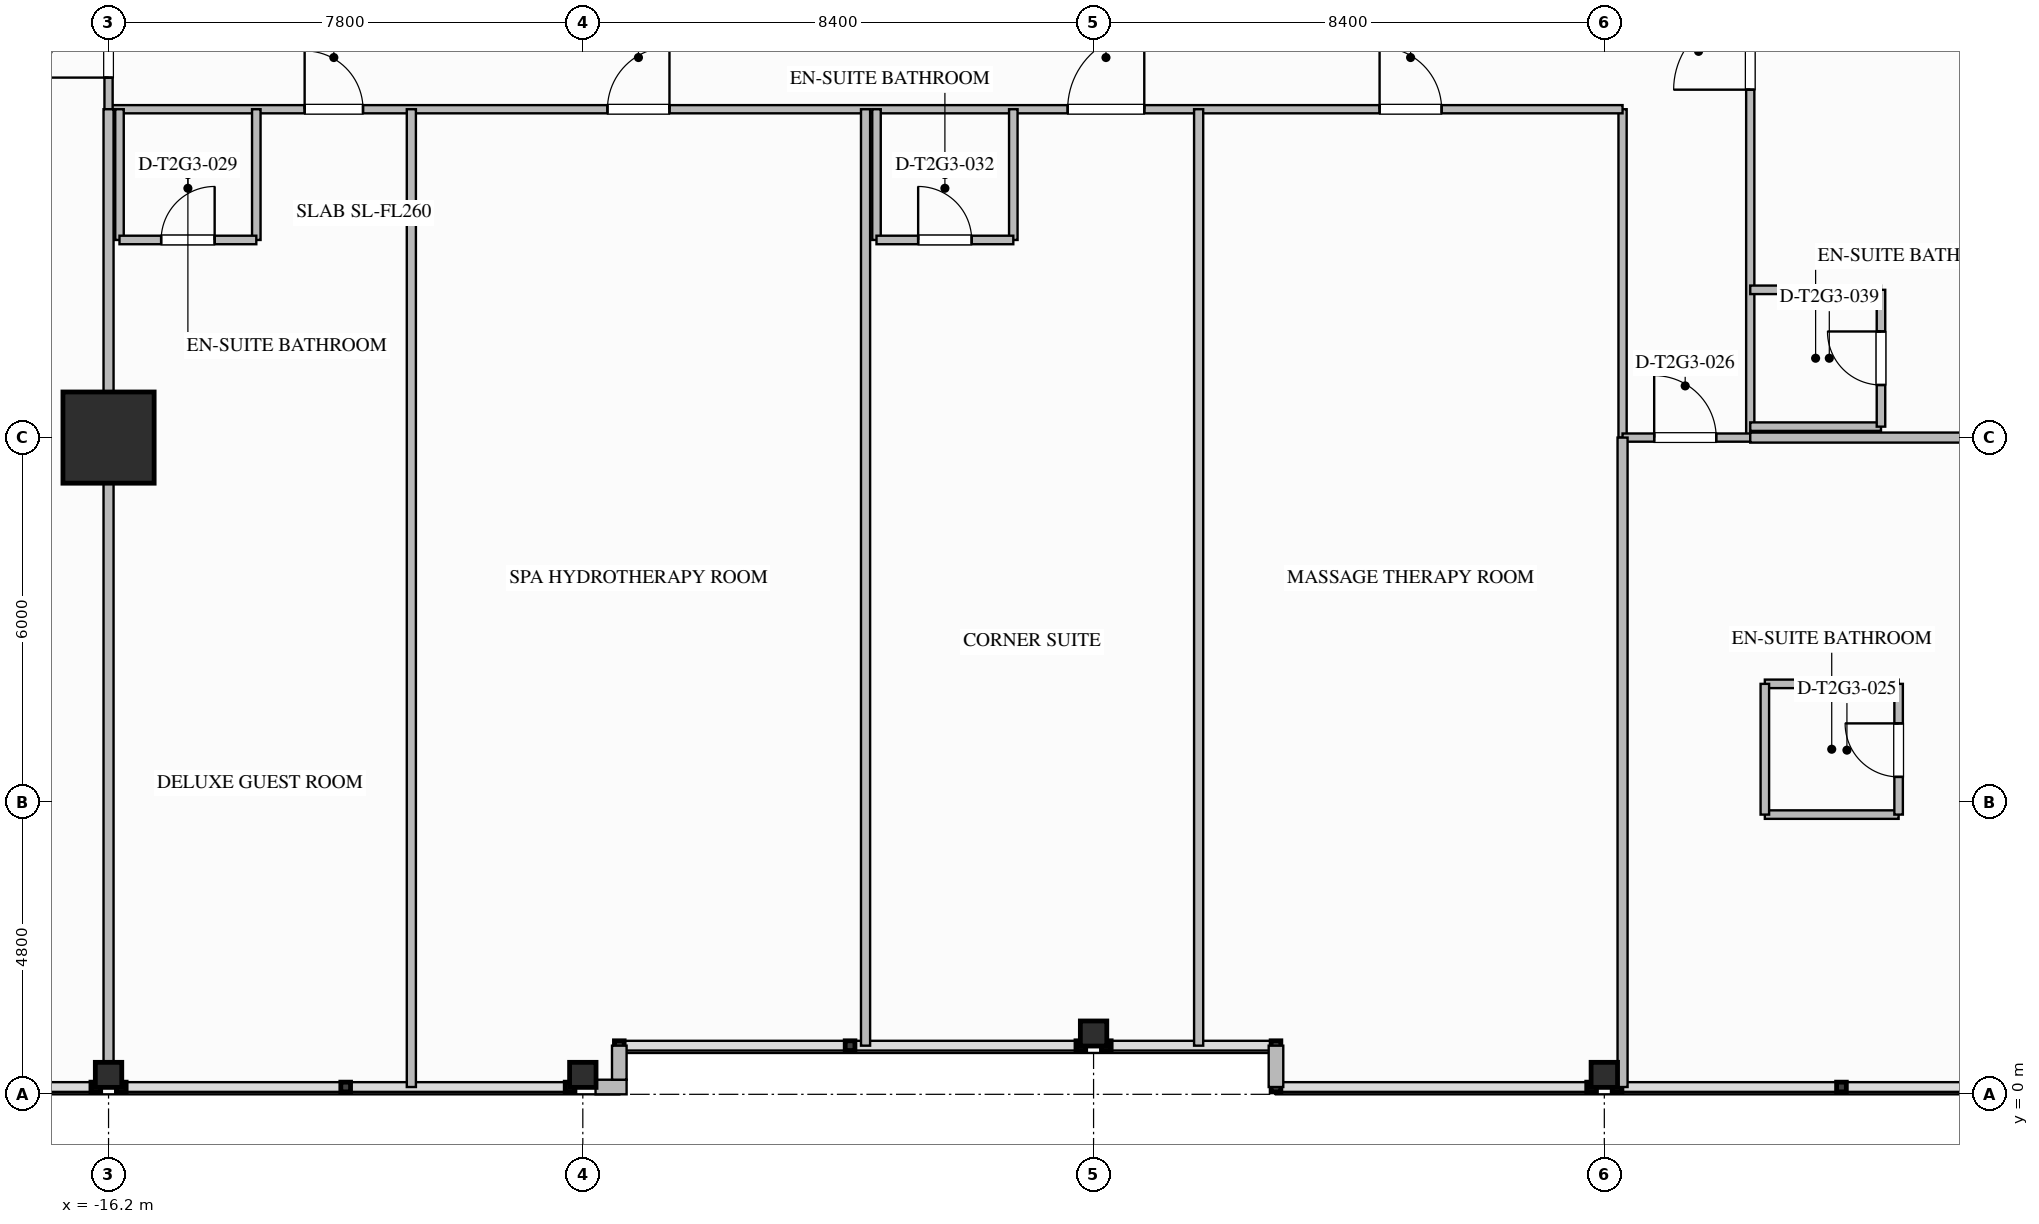
"""IFC4 building model, lengths in metres.
Left out: names, types, materials, properties, quantities, classifications, styles, units other than length and angle.
Written with IfcOpenShell. Run it as: python <this file> out.ifc"""

import sys

from ifc_helpers import new_model, si_unit, direction, frame, frame_2d, origin, origin_2d, place, context, subcontext, project, spatial, rectangle, i_section, extrude, element, fill, save


model = new_model("IFC4")
c1 = context("Model", 3, precision=1e-05, world=origin(), true_north=direction((0.0, 1.0)))
c2 = subcontext(c1, "Body", "Model", "MODEL_VIEW")
j1 = project(units=[si_unit("LENGTHUNIT", "METRE"), si_unit("PLANEANGLEUNIT", "RADIAN")], contexts=[c1])
p1 = place(None, origin())
s1 = spatial("IfcSite", under=j1, at=p1, CompositionType="ELEMENT")
p2 = place(p1, origin())
s2 = spatial("IfcBuilding", under=s1, at=p2, CompositionType="ELEMENT")
p3 = place(p2, frame((0.0, 0.0, 119.8)))
s3 = spatial("IfcBuildingStorey", under=s2, at=p3, CompositionType="ELEMENT", Elevation=119.8)
p4 = place(p3, frame((-16.2, 10.8, 0.0), z_axis=(0.0, 0.0, 1.0), x_axis=(1.0, 0.0, 0.0)))
e1 = element("IfcColumn", 1, at=p4, inside=s3, PredefinedType="COLUMN", context=c2, shape_type="SweptSolid", body=[
    extrude(rectangle(XDim=1.5, YDim=1.5, at=origin_2d()), origin(), (0.0, 0.0, 1.0), 3.5),
])
for number, where, z_axis, x_axis in (
    (2, (-16.2, 0.32, 0.0), (0.0, 0.0, 1.0), (0.0, 1.0, 0.0)),
    (3, (-8.4, 0.32, 0.0), (0.0, 0.0, 1.0), (0.0, 1.0, 0.0)),
    (4, (0.0, 1.0, 0.0), (0.0, 0.0, 1.0), (0.0, 1.0, 0.0)),
    (5, (8.4, 0.32, 0.0), (0.0, 0.0, 1.0), (0.0, 1.0, 0.0)),
):
    element("IfcColumn", number, at=place(p3, frame(where, z_axis=z_axis, x_axis=x_axis)), inside=s3, PredefinedType="COLUMN", context=c2, shape_type="SweptSolid", body=[
        extrude(i_section(OverallWidth=0.412, OverallDepth=0.435, WebThickness=0.036, FlangeThickness=0.057, FilletRadius=0.028, at=origin_2d()), origin(), (0.0, 0.0, 1.0), 3.497),
    ])
p5 = place(p3, frame((-7.68, 0.12, 0.0), z_axis=(0.0, 0.0, 1.0), x_axis=(-1.0, 0.0, 0.0)))
e6 = element("IfcWall", 6, at=p5, inside=s3, PredefinedType="STANDARD", context=c2, shape_type="SweptSolid", body=[
    extrude(rectangle(XDim=0.511, YDim=0.24, at=frame_2d((0.255, 0.0))), origin(), (0.0, 0.0, 1.0), 3.24),
])
p6 = place(p3, frame((3.0, 0.12, 0.0), z_axis=(0.0, 0.0, 1.0), x_axis=(0.0, 1.0, 0.0)))
e7 = element("IfcWall", 7, at=p6, inside=s3, PredefinedType="STANDARD", context=c2, shape_type="SweptSolid", body=[
    extrude(rectangle(XDim=0.68, YDim=0.24, at=frame_2d((0.34, 0.0))), origin(), (0.0, 0.0, 1.0), 3.24),
])
p7 = place(p3, frame((-7.8, 0.8, 0.0), z_axis=(0.0, 0.0, 1.0), x_axis=(0.0, -1.0, 0.0)))
e8 = element("IfcWall", 8, at=p7, inside=s3, PredefinedType="STANDARD", context=c2, shape_type="SweptSolid", body=[
    extrude(rectangle(XDim=0.56, YDim=0.24, at=frame_2d((0.28, 0.0))), origin(), (0.0, 0.0, 1.0), 3.24),
])
p8 = place(p3, frame((8.7, 10.8, 0.0), z_axis=(0.0, 0.0, 1.0), x_axis=(0.0, 1.0, 0.0)))
e9 = element("IfcWall", 9, at=p8, inside=s3, PredefinedType="PARTITIONING", context=c2, shape_type="SweptSolid", body=[
    extrude(rectangle(XDim=5.4, YDim=0.135, at=frame_2d((2.7, 0.0))), origin(), (0.0, 0.0, 1.0), 3.24),
])
p9 = place(p3, frame((-16.2, 16.2, 0.0), z_axis=(0.0, 0.0, 1.0), x_axis=(1.0, 0.0, 0.0)))
e10 = element("IfcWall", 10, at=p9, inside=s3, PredefinedType="PARTITIONING", context=c2, shape_type="SweptSolid", body=[
    extrude(rectangle(XDim=24.9, YDim=0.135, at=frame_2d((12.45, 0.0))), origin(), (0.0, 0.0, 1.0), 3.24),
])
p10 = place(p9, frame((3.225, 0.0, 0.0)))
e11 = element("IfcOpeningElement", 11, at=p10, cuts=e10, PredefinedType="OPENING", context=c2, shape_type="SweptSolid", body=[
    extrude(rectangle(XDim=0.96, YDim=2.15, at=frame_2d((0.48, 1.075))), frame((0.0, 0.077, 0.0), z_axis=(0.0, -1.0, 0.0), x_axis=(1.0, 0.0, 0.0)), (0.0, 0.0, 1.0), 0.155),
])
p11 = place(p9, frame((8.205, 0.0, 0.0)))
e12 = element("IfcOpeningElement", 12, at=p11, cuts=e10, PredefinedType="OPENING", context=c2, shape_type="SweptSolid", body=[
    extrude(rectangle(XDim=1.02, YDim=2.15, at=frame_2d((0.51, 1.075))), frame((0.0, 0.077, 0.0), z_axis=(0.0, -1.0, 0.0), x_axis=(1.0, 0.0, 0.0)), (0.0, 0.0, 1.0), 0.155),
])
p12 = place(p9, frame((15.774, 0.0, 0.0)))
e13 = element("IfcOpeningElement", 13, at=p12, cuts=e10, PredefinedType="OPENING", context=c2, shape_type="SweptSolid", body=[
    extrude(rectangle(XDim=1.26, YDim=2.2, at=frame_2d((0.63, 1.1))), frame((0.0, 0.077, 0.0), z_axis=(0.0, -1.0, 0.0), x_axis=(1.0, 0.0, 0.0)), (0.0, 0.0, 1.0), 0.155),
])
p13 = place(p9, frame((20.904, 0.0, 0.0)))
e14 = element("IfcOpeningElement", 14, at=p13, cuts=e10, PredefinedType="OPENING", context=c2, shape_type="SweptSolid", body=[
    extrude(rectangle(XDim=1.02, YDim=2.15, at=frame_2d((0.51, 1.075))), frame((0.0, 0.077, 0.0), z_axis=(0.0, -1.0, 0.0), x_axis=(1.0, 0.0, 0.0)), (0.0, 0.0, 1.0), 0.155),
])
p14 = place(p3, frame((10.8, 10.8, 0.0), z_axis=(0.0, 0.0, 1.0), x_axis=(0.0, 1.0, 0.0)))
e15 = element("IfcWall", 15, at=p14, inside=s3, PredefinedType="PARTITIONING", context=c2, shape_type="SweptSolid", body=[
    extrude(rectangle(XDim=32.4, YDim=0.135, at=frame_2d((16.2, 0.0))), origin(), (0.0, 0.0, 1.0), 3.24),
])
p15 = place(p14, frame((5.722, 0.0, 0.0)))
e16 = element("IfcOpeningElement", 16, at=p15, cuts=e15, PredefinedType="OPENING", context=c2, shape_type="SweptSolid", body=[
    extrude(rectangle(XDim=1.26, YDim=2.2, at=frame_2d((0.63, 1.1))), frame((0.0, 0.077, 0.0), z_axis=(0.0, -1.0, 0.0), x_axis=(1.0, 0.0, 0.0)), (0.0, 0.0, 1.0), 0.155),
])
p16 = place(p14, frame((16.085, 0.0, 0.0)))
e17 = element("IfcOpeningElement", 17, at=p16, cuts=e15, PredefinedType="OPENING", context=c2, shape_type="SweptSolid", body=[
    extrude(rectangle(XDim=1.02, YDim=2.15, at=frame_2d((0.51, 1.075))), frame((0.0, 0.077, 0.0), z_axis=(0.0, -1.0, 0.0), x_axis=(1.0, 0.0, 0.0)), (0.0, 0.0, 1.0), 0.155),
])
p17 = place(p14, frame((28.244, 0.0, 0.0)))
e18 = element("IfcOpeningElement", 18, at=p17, cuts=e15, PredefinedType="OPENING", context=c2, shape_type="SweptSolid", body=[
    extrude(rectangle(XDim=1.26, YDim=2.2, at=frame_2d((0.63, 1.1))), frame((0.0, 0.077, 0.0), z_axis=(0.0, -1.0, 0.0), x_axis=(1.0, 0.0, 0.0)), (0.0, 0.0, 1.0), 0.155),
])
p18 = place(p3, frame((-16.2, 16.2, 0.0), z_axis=(0.0, 0.0, 1.0), x_axis=(0.0, 1.0, 0.0)))
e19 = element("IfcWall", 19, at=p18, inside=s3, PredefinedType="PARTITIONING", context=c2, shape_type="SweptSolid", body=[
    extrude(rectangle(XDim=2.1, YDim=0.135, at=frame_2d((1.05, 0.0))), origin(), (0.0, 0.0, 1.0), 2.53),
])
p19 = place(p18, frame((0.52, 0.0, 0.0)))
e20 = element("IfcOpeningElement", 20, at=p19, cuts=e19, PredefinedType="OPENING", context=c2, shape_type="SweptSolid", body=[
    extrude(rectangle(XDim=1.02, YDim=2.15, at=frame_2d((0.51, 1.075))), frame((0.0, 0.077, 0.0), z_axis=(0.0, -1.0, 0.0), x_axis=(1.0, 0.0, 0.0)), (0.0, 0.0, 1.0), 0.155),
])
p20 = place(p3, frame((8.7, 10.8, 0.0), z_axis=(0.0, 0.0, 1.0), x_axis=(1.0, 0.0, 0.0)))
e21 = element("IfcWall", 21, at=p20, inside=s3, PredefinedType="PARTITIONING", context=c2, shape_type="SweptSolid", body=[
    extrude(rectangle(XDim=2.1, YDim=0.135, at=frame_2d((1.05, 0.0))), origin(), (0.0, 0.0, 1.0), 2.53),
])
p21 = place(p20, frame((0.52, 0.0, 0.0)))
e22 = element("IfcOpeningElement", 22, at=p21, cuts=e21, PredefinedType="OPENING", context=c2, shape_type="SweptSolid", body=[
    extrude(rectangle(XDim=1.02, YDim=2.15, at=frame_2d((0.51, 1.075))), frame((0.0, 0.077, 0.0), z_axis=(0.0, -1.0, 0.0), x_axis=(1.0, 0.0, 0.0)), (0.0, 0.0, 1.0), 0.155),
])
p22 = place(p3, frame((-16.2, 0.12, 0.0), z_axis=(0.0, 0.0, 1.0), x_axis=(0.0, 1.0, 0.0)))
e23 = element("IfcWall", 23, at=p22, inside=s3, PredefinedType="PARTITIONING", context=c2, shape_type="SweptSolid", body=[
    extrude(rectangle(XDim=16.08, YDim=0.165, at=frame_2d((8.04, 0.0))), origin(), (0.0, 0.0, 1.0), 2.53),
])
p23 = place(p3, frame((8.7, 0.12, 0.0), z_axis=(0.0, 0.0, 1.0), x_axis=(0.0, 1.0, 0.0)))
e24 = element("IfcWall", 24, at=p23, inside=s3, PredefinedType="PARTITIONING", context=c2, shape_type="SweptSolid", body=[
    extrude(rectangle(XDim=10.68, YDim=0.165, at=frame_2d((5.34, 0.0))), origin(), (0.0, 0.0, 1.0), 2.53),
])
p24 = place(p3, frame((10.8, 10.8, 0.0), z_axis=(0.0, 0.0, 1.0), x_axis=(1.0, 0.0, 0.0)))
e25 = element("IfcWall", 25, at=p24, inside=s3, PredefinedType="PARTITIONING", context=c2, shape_type="SweptSolid", body=[
    extrude(rectangle(XDim=11.28, YDim=0.165, at=frame_2d((5.64, 0.0))), origin(), (0.0, 0.0, 1.0), 2.53),
])
for number, where, z_axis, x_axis in (
    (26, (11.04, 4.6, 0.0), (0.0, 0.0, 1.0), (1.0, 0.0, 0.0)),
    (27, (11.04, 6.75, 0.0), (0.0, 0.0, 1.0), (1.0, 0.0, 0.0)),
):
    element("IfcWall", number, at=place(p3, frame(where, z_axis=z_axis, x_axis=x_axis)), inside=s3, PredefinedType="PLUMBINGWALL", context=c2, shape_type="SweptSolid", body=[
        extrude(rectangle(XDim=2.2, YDim=0.14, at=frame_2d((1.1, 0.0))), origin(), (0.0, 0.0, 1.0), 3.24),
    ])
p25 = place(p3, frame((11.04, 4.6, 0.0), z_axis=(0.0, 0.0, 1.0), x_axis=(0.0, 1.0, 0.0)))
e28 = element("IfcWall", 28, at=p25, inside=s3, PredefinedType="PLUMBINGWALL", context=c2, shape_type="SweptSolid", body=[
    extrude(rectangle(XDim=2.15, YDim=0.14, at=frame_2d((1.075, 0.0))), origin(), (0.0, 0.0, 1.0), 3.24),
])
p26 = place(p3, frame((13.24, 4.6, 0.0), z_axis=(0.0, 0.0, 1.0), x_axis=(0.0, 1.0, 0.0)))
e29 = element("IfcWall", 29, at=p26, inside=s3, PredefinedType="PLUMBINGWALL", context=c2, shape_type="SweptSolid", body=[
    extrude(rectangle(XDim=2.15, YDim=0.14, at=frame_2d((1.075, 0.0))), origin(), (0.0, 0.0, 1.0), 3.24),
])
p27 = place(p26, frame((0.62, 0.0, 0.0)))
e30 = element("IfcOpeningElement", 30, at=p27, cuts=e29, PredefinedType="OPENING", context=c2, shape_type="SweptSolid", body=[
    extrude(rectangle(XDim=0.88, YDim=2.1, at=frame_2d((0.44, 1.05))), frame((0.0, 0.08, 0.0), z_axis=(0.0, -1.0, 0.0), x_axis=(1.0, 0.0, 0.0)), (0.0, 0.0, 1.0), 0.16),
])
p28 = place(p3, frame((-16.02, 16.2, 0.0), z_axis=(0.0, 0.0, 1.0), x_axis=(0.0, -1.0, 0.0)))
e31 = element("IfcWall", 31, at=p28, inside=s3, PredefinedType="PLUMBINGWALL", context=c2, shape_type="SweptSolid", body=[
    extrude(rectangle(XDim=2.15, YDim=0.14, at=frame_2d((1.075, 0.0))), origin(), (0.0, 0.0, 1.0), 2.53),
])
p29 = place(p3, frame((-13.77, 16.2, 0.0), z_axis=(0.0, 0.0, 1.0), x_axis=(0.0, -1.0, 0.0)))
e32 = element("IfcWall", 32, at=p29, inside=s3, PredefinedType="PLUMBINGWALL", context=c2, shape_type="SweptSolid", body=[
    extrude(rectangle(XDim=2.15, YDim=0.14, at=frame_2d((1.075, 0.0))), origin(), (0.0, 0.0, 1.0), 3.24),
])
p30 = place(p3, frame((-16.02, 14.05, 0.0), z_axis=(0.0, 0.0, 1.0), x_axis=(1.0, 0.0, 0.0)))
e33 = element("IfcWall", 33, at=p30, inside=s3, PredefinedType="PLUMBINGWALL", context=c2, shape_type="SweptSolid", body=[
    extrude(rectangle(XDim=2.25, YDim=0.14, at=frame_2d((1.125, 0.0))), origin(), (0.0, 0.0, 1.0), 3.24),
])
p31 = place(p30, frame((0.685, 0.0, 0.0)))
e34 = element("IfcOpeningElement", 34, at=p31, cuts=e33, PredefinedType="OPENING", context=c2, shape_type="SweptSolid", body=[
    extrude(rectangle(XDim=0.88, YDim=2.1, at=frame_2d((0.44, 1.05))), frame((0.0, 0.08, 0.0), z_axis=(0.0, -1.0, 0.0), x_axis=(1.0, 0.0, 0.0)), (0.0, 0.0, 1.0), 0.16),
])
p32 = place(p3, frame((-11.22, 0.12, 0.0), z_axis=(0.0, 0.0, 1.0), x_axis=(0.0, 1.0, 0.0)))
e35 = element("IfcWall", 35, at=p32, inside=s3, PredefinedType="PARTITIONING", context=c2, shape_type="SweptSolid", body=[
    extrude(rectangle(XDim=16.08, YDim=0.15, at=frame_2d((8.04, 0.0))), origin(), (0.0, 0.0, 1.0), 3.24),
])
p33 = place(p3, frame((-3.75, 0.8, 0.0), z_axis=(0.0, 0.0, 1.0), x_axis=(0.0, 1.0, 0.0)))
e36 = element("IfcWall", 36, at=p33, inside=s3, PredefinedType="PARTITIONING", context=c2, shape_type="SweptSolid", body=[
    extrude(rectangle(XDim=15.4, YDim=0.15, at=frame_2d((7.7, 0.0))), origin(), (0.0, 0.0, 1.0), 3.24),
])
for number, where, z_axis, x_axis in (
    (37, (-3.57, 16.2, 0.0), (0.0, 0.0, 1.0), (0.0, -1.0, 0.0)),
    (38, (-1.32, 16.2, 0.0), (0.0, 0.0, 1.0), (0.0, -1.0, 0.0)),
):
    element("IfcWall", number, at=place(p3, frame(where, z_axis=z_axis, x_axis=x_axis)), inside=s3, PredefinedType="PLUMBINGWALL", context=c2, shape_type="SweptSolid", body=[
        extrude(rectangle(XDim=2.15, YDim=0.14, at=frame_2d((1.075, 0.0))), origin(), (0.0, 0.0, 1.0), 3.24),
    ])
p34 = place(p3, frame((-3.57, 14.05, 0.0), z_axis=(0.0, 0.0, 1.0), x_axis=(1.0, 0.0, 0.0)))
e39 = element("IfcWall", 39, at=p34, inside=s3, PredefinedType="PLUMBINGWALL", context=c2, shape_type="SweptSolid", body=[
    extrude(rectangle(XDim=2.25, YDim=0.14, at=frame_2d((1.125, 0.0))), origin(), (0.0, 0.0, 1.0), 3.24),
])
p35 = place(p34, frame((0.685, 0.0, 0.0)))
e40 = element("IfcOpeningElement", 40, at=p35, cuts=e39, PredefinedType="OPENING", context=c2, shape_type="SweptSolid", body=[
    extrude(rectangle(XDim=0.88, YDim=2.1, at=frame_2d((0.44, 1.05))), frame((0.0, 0.08, 0.0), z_axis=(0.0, -1.0, 0.0), x_axis=(1.0, 0.0, 0.0)), (0.0, 0.0, 1.0), 0.16),
])
p36 = place(p3, frame((1.728, 0.8, 0.0), z_axis=(0.0, 0.0, 1.0), x_axis=(0.0, 1.0, 0.0)))
e41 = element("IfcWall", 41, at=p36, inside=s3, PredefinedType="PARTITIONING", context=c2, shape_type="SweptSolid", body=[
    extrude(rectangle(XDim=15.4, YDim=0.15, at=frame_2d((7.7, 0.0))), origin(), (0.0, 0.0, 1.0), 3.24),
])
p37 = place(p3, frame((10.8, 10.98, 0.0), z_axis=(0.0, 0.0, 1.0), x_axis=(1.0, 0.0, 0.0)))
e42 = element("IfcWall", 42, at=p37, inside=s3, PredefinedType="PLUMBINGWALL", context=c2, shape_type="SweptSolid", body=[
    extrude(rectangle(XDim=2.15, YDim=0.14, at=frame_2d((1.075, 0.0))), origin(), (0.0, 0.0, 1.0), 2.53),
])
p38 = place(p3, frame((10.8, 13.23, 0.0), z_axis=(0.0, 0.0, 1.0), x_axis=(1.0, 0.0, 0.0)))
e43 = element("IfcWall", 43, at=p38, inside=s3, PredefinedType="PLUMBINGWALL", context=c2, shape_type="SweptSolid", body=[
    extrude(rectangle(XDim=2.15, YDim=0.14, at=frame_2d((1.075, 0.0))), origin(), (0.0, 0.0, 1.0), 3.24),
])
p39 = place(p3, frame((12.95, 10.98, 0.0), z_axis=(0.0, 0.0, 1.0), x_axis=(0.0, 1.0, 0.0)))
e44 = element("IfcWall", 44, at=p39, inside=s3, PredefinedType="PLUMBINGWALL", context=c2, shape_type="SweptSolid", body=[
    extrude(rectangle(XDim=2.25, YDim=0.14, at=frame_2d((1.125, 0.0))), origin(), (0.0, 0.0, 1.0), 3.24),
])
p40 = place(p39, frame((0.685, 0.0, 0.0)))
e45 = element("IfcOpeningElement", 45, at=p40, cuts=e44, PredefinedType="OPENING", context=c2, shape_type="SweptSolid", body=[
    extrude(rectangle(XDim=0.88, YDim=2.1, at=frame_2d((0.44, 1.05))), frame((0.0, 0.08, 0.0), z_axis=(0.0, -1.0, 0.0), x_axis=(1.0, 0.0, 0.0)), (0.0, 0.0, 1.0), 0.16),
])
p41 = place(p19, origin())
e46 = element("IfcDoor", 46, at=p41, inside=s3, OperationType="SINGLE_SWING_LEFT", PredefinedType="DOOR", context=c2, shape_type="SweptSolid", body=[
    extrude(rectangle(XDim=1.02, YDim=2.15, at=frame_2d((0.51, 1.075))), frame((0.0, 0.025, 0.0), z_axis=(0.0, -1.0, 0.0), x_axis=(1.0, 0.0, 0.0)), (0.0, 0.0, 1.0), 0.05),
])
fill(e20, e46)
p42 = place(p27, origin())
e47 = element("IfcDoor", 47, at=p42, inside=s3, OperationType="SINGLE_SWING_RIGHT", PredefinedType="DOOR", context=c2, shape_type="SweptSolid", body=[
    extrude(rectangle(XDim=0.88, YDim=2.1, at=frame_2d((0.44, 1.05))), frame((0.0, 0.025, 0.0), z_axis=(0.0, -1.0, 0.0), x_axis=(1.0, 0.0, 0.0)), (0.0, 0.0, 1.0), 0.05),
])
fill(e30, e47)
p43 = place(p21, origin())
e48 = element("IfcDoor", 48, at=p43, inside=s3, OperationType="SINGLE_SWING_LEFT", PredefinedType="DOOR", context=c2, shape_type="SweptSolid", body=[
    extrude(rectangle(XDim=1.02, YDim=2.15, at=frame_2d((0.51, 1.075))), frame((0.0, 0.025, 0.0), z_axis=(0.0, -1.0, 0.0), x_axis=(1.0, 0.0, 0.0)), (0.0, 0.0, 1.0), 0.05),
])
fill(e22, e48)
p44 = place(p31, origin())
e49 = element("IfcDoor", 49, at=p44, inside=s3, OperationType="SINGLE_SWING_RIGHT", PredefinedType="DOOR", context=c2, shape_type="SweptSolid", body=[
    extrude(rectangle(XDim=0.88, YDim=2.1, at=frame_2d((0.44, 1.05))), frame((0.0, 0.025, 0.0), z_axis=(0.0, -1.0, 0.0), x_axis=(1.0, 0.0, 0.0)), (0.0, 0.0, 1.0), 0.05),
])
fill(e34, e49)
p45 = place(p10, origin())
e50 = element("IfcDoor", 50, at=p45, inside=s3, OperationType="SINGLE_SWING_LEFT", PredefinedType="DOOR", context=c2, shape_type="SweptSolid", body=[
    extrude(rectangle(XDim=0.96, YDim=2.15, at=frame_2d((0.48, 1.075))), frame((0.0, 0.025, 0.0), z_axis=(0.0, -1.0, 0.0), x_axis=(1.0, 0.0, 0.0)), (0.0, 0.0, 1.0), 0.05),
])
fill(e11, e50)
p46 = place(p11, origin())
e51 = element("IfcDoor", 51, at=p46, inside=s3, OperationType="SINGLE_SWING_RIGHT", PredefinedType="DOOR", context=c2, shape_type="SweptSolid", body=[
    extrude(rectangle(XDim=1.02, YDim=2.15, at=frame_2d((0.51, 1.075))), frame((0.0, 0.025, 0.0), z_axis=(0.0, -1.0, 0.0), x_axis=(1.0, 0.0, 0.0)), (0.0, 0.0, 1.0), 0.05),
])
fill(e12, e51)
p47 = place(p35, origin())
e52 = element("IfcDoor", 52, at=p47, inside=s3, OperationType="SINGLE_SWING_LEFT", PredefinedType="DOOR", context=c2, shape_type="SweptSolid", body=[
    extrude(rectangle(XDim=0.88, YDim=2.1, at=frame_2d((0.44, 1.05))), frame((0.0, 0.025, 0.0), z_axis=(0.0, -1.0, 0.0), x_axis=(1.0, 0.0, 0.0)), (0.0, 0.0, 1.0), 0.05),
])
fill(e40, e52)
p48 = place(p12, origin())
e53 = element("IfcDoor", 53, at=p48, inside=s3, OperationType="SINGLE_SWING_RIGHT", PredefinedType="DOOR", context=c2, shape_type="SweptSolid", body=[
    extrude(rectangle(XDim=1.26, YDim=2.2, at=frame_2d((0.63, 1.1))), frame((0.0, 0.025, 0.0), z_axis=(0.0, -1.0, 0.0), x_axis=(1.0, 0.0, 0.0)), (0.0, 0.0, 1.0), 0.05),
])
fill(e13, e53)
p49 = place(p13, origin())
e54 = element("IfcDoor", 54, at=p49, inside=s3, OperationType="SINGLE_SWING_LEFT", PredefinedType="DOOR", context=c2, shape_type="SweptSolid", body=[
    extrude(rectangle(XDim=1.02, YDim=2.15, at=frame_2d((0.51, 1.075))), frame((0.0, 0.025, 0.0), z_axis=(0.0, -1.0, 0.0), x_axis=(1.0, 0.0, 0.0)), (0.0, 0.0, 1.0), 0.05),
])
fill(e14, e54)
p50 = place(p40, origin())
e55 = element("IfcDoor", 55, at=p50, inside=s3, OperationType="SINGLE_SWING_RIGHT", PredefinedType="DOOR", context=c2, shape_type="SweptSolid", body=[
    extrude(rectangle(XDim=0.88, YDim=2.1, at=frame_2d((0.44, 1.05))), frame((0.0, 0.025, 0.0), z_axis=(0.0, -1.0, 0.0), x_axis=(1.0, 0.0, 0.0)), (0.0, 0.0, 1.0), 0.05),
])
fill(e45, e55)
p51 = place(p15, origin())
e56 = element("IfcDoor", 56, at=p51, inside=s3, OperationType="SINGLE_SWING_LEFT", PredefinedType="DOOR", context=c2, shape_type="SweptSolid", body=[
    extrude(rectangle(XDim=1.26, YDim=2.2, at=frame_2d((0.63, 1.1))), frame((0.0, 0.025, 0.0), z_axis=(0.0, -1.0, 0.0), x_axis=(1.0, 0.0, 0.0)), (0.0, 0.0, 1.0), 0.05),
])
fill(e16, e56)
save(model, sys.argv[1])
